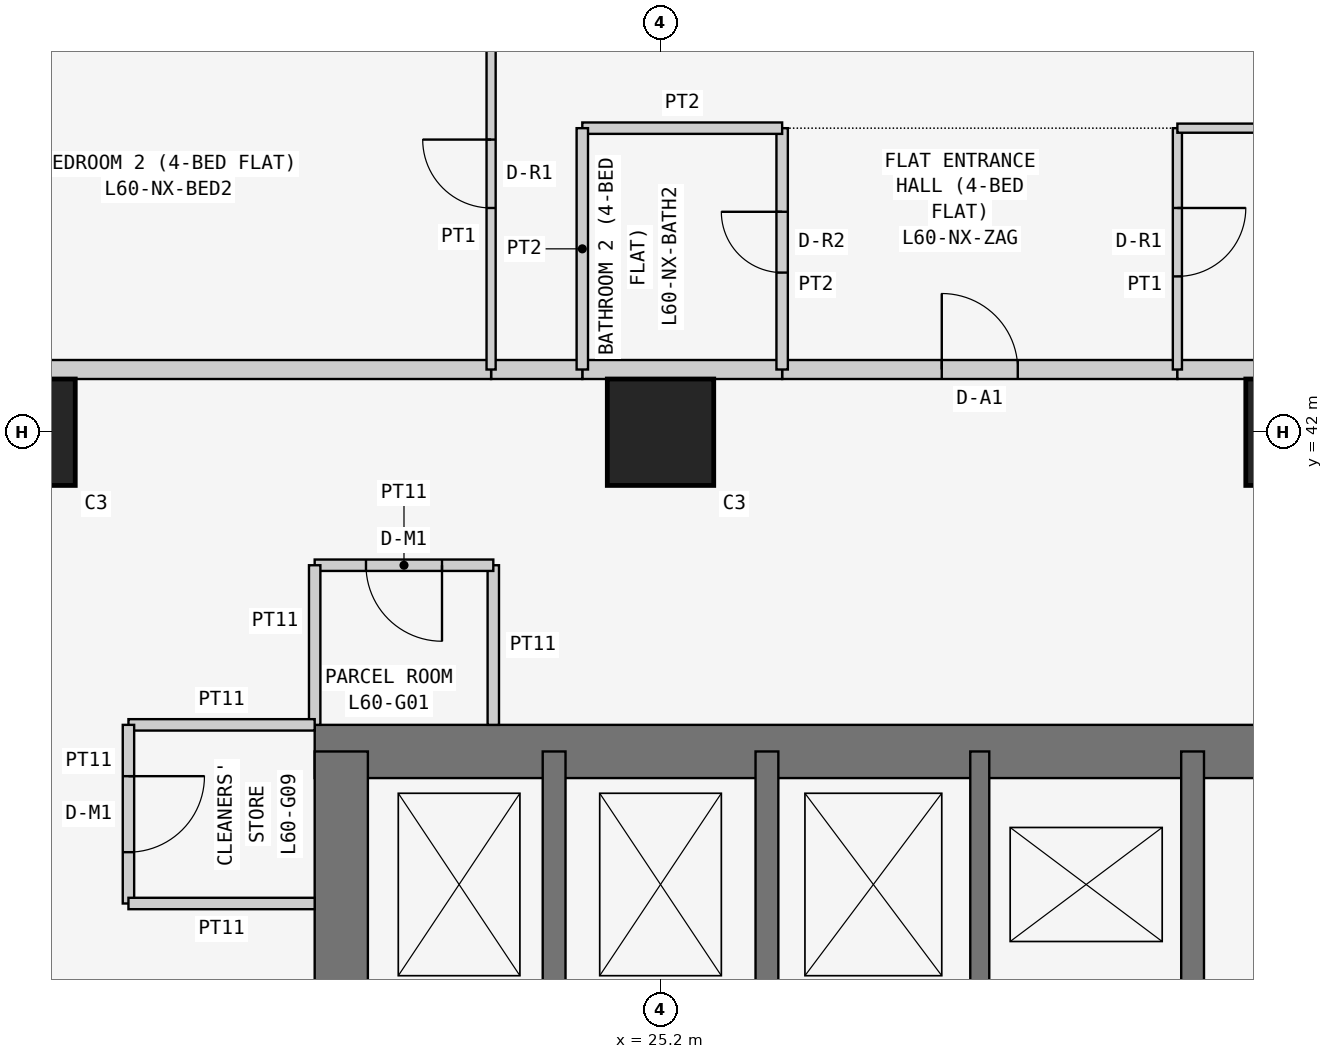
"""IFC4 building model, lengths in metres.
Left out: names, types, materials, properties, quantities, classifications, styles, units other than length and angle.
Written with IfcOpenShell. Run it as: python <this file> out.ifc"""

import sys

from ifc_helpers import new_model, si_unit, direction, frame, frame_2d, origin, origin_2d, place, context, subcontext, project, spatial, rectangle, extrude, element, fill, save


model = new_model("IFC4")
c1 = context("Model", 3, precision=1e-05, world=origin(), true_north=direction((0.0, 1.0)))
c2 = subcontext(c1, "Body", "Model", "MODEL_VIEW")
j1 = project(units=[si_unit("LENGTHUNIT", "METRE"), si_unit("PLANEANGLEUNIT", "RADIAN")], contexts=[c1])
p1 = place(None, origin())
s1 = spatial("IfcSite", under=j1, at=p1, CompositionType="ELEMENT")
p2 = place(p1, origin())
s2 = spatial("IfcBuilding", under=s1, at=p2, CompositionType="ELEMENT")
p3 = place(p2, frame((0.0, 0.0, 230.1)))
s3 = spatial("IfcBuildingStorey", under=s2, at=p3, CompositionType="ELEMENT", Elevation=230.1)
for number, where, z_axis, x_axis in (
    (1, (16.8, 42.0, 0.0), (0.0, 0.0, 1.0), (1.0, 0.0, 0.0)),
    (2, (25.2, 42.0, 0.0), (0.0, 0.0, 1.0), (1.0, 0.0, 0.0)),
    (3, (33.6, 42.0, 0.0), (0.0, 0.0, 1.0), (1.0, 0.0, 0.0)),
):
    element("IfcColumn", number, at=place(p3, frame(where, z_axis=z_axis, x_axis=x_axis)), inside=s3, PredefinedType="COLUMN", context=c2, shape_type="SweptSolid", body=[
        extrude(rectangle(XDim=1.4, YDim=1.4, at=origin_2d()), origin(), (0.0, 0.0, 1.0), 3.6),
    ])
p4 = place(p3, frame((37.8, 37.8, 0.0), z_axis=(0.0, 0.0, 1.0), x_axis=(-1.0, 0.0, 0.0)))
e4 = element("IfcWall", 4, at=p4, inside=s3, PredefinedType="SHEAR", context=c2, shape_type="SweptSolid", body=[
    extrude(rectangle(XDim=17.15, YDim=0.7, at=frame_2d((8.575, 0.0))), origin(), (0.0, 0.0, 1.0), 3.6),
])
p5 = place(p3, frame((21.0, 37.8, 0.0), z_axis=(0.0, 0.0, 1.0), x_axis=(0.0, -1.0, 0.0)))
e5 = element("IfcWall", 5, at=p5, inside=s3, PredefinedType="SHEAR", context=c2, shape_type="SweptSolid", body=[
    extrude(rectangle(XDim=17.15, YDim=0.7, at=frame_2d((8.575, 0.0))), origin(), (0.0, 0.0, 1.0), 3.6),
])
p6 = place(p5, frame((5.4, 0.0, 0.0)))
e6 = element("IfcOpeningElement", 6, at=p6, cuts=e5, PredefinedType="OPENING", context=c2, shape_type="SweptSolid", body=[
    extrude(rectangle(XDim=1.2, YDim=2.1, at=frame_2d((0.6, 1.05))), frame((0.0, 0.36, 0.0), z_axis=(0.0, -1.0, 0.0), x_axis=(1.0, 0.0, 0.0)), (0.0, 0.0, 1.0), 0.72),
])
p7 = place(p3, frame((26.6, 21.0, 0.0), z_axis=(0.0, 0.0, 1.0), x_axis=(0.0, 1.0, 0.0)))
e7 = element("IfcWall", 7, at=p7, inside=s3, PredefinedType="SHEAR", context=c2, shape_type="SweptSolid", body=[
    extrude(rectangle(XDim=16.8, YDim=0.3, at=frame_2d((8.4, 0.0))), origin(), (0.0, 0.0, 1.0), 3.6),
])
p8 = place(p7, frame((10.4, 0.0, 0.0)))
e8 = element("IfcOpeningElement", 8, at=p8, cuts=e7, PredefinedType="OPENING", context=c2, shape_type="SweptSolid", body=[
    extrude(rectangle(XDim=1.2, YDim=2.1, at=frame_2d((0.6, 1.05))), frame((0.0, 0.16, 0.0), z_axis=(0.0, -1.0, 0.0), x_axis=(1.0, 0.0, 0.0)), (0.0, 0.0, 1.0), 0.32),
])
p9 = place(p3, frame((23.8, 34.6, 0.0), z_axis=(0.0, 0.0, 1.0), x_axis=(0.0, 1.0, 0.0)))
e9 = element("IfcWall", 9, at=p9, inside=s3, PredefinedType="SHEAR", context=c2, shape_type="SweptSolid", body=[
    extrude(rectangle(XDim=3.2, YDim=0.3, at=frame_2d((1.6, 0.0))), origin(), (0.0, 0.0, 1.0), 3.6),
])
p10 = place(p3, frame((32.2, 29.25, 0.0), z_axis=(0.0, 0.0, 1.0), x_axis=(0.0, 1.0, 0.0)))
e10 = element("IfcWall", 10, at=p10, inside=s3, PredefinedType="SHEAR", context=c2, shape_type="SweptSolid", body=[
    extrude(rectangle(XDim=8.55, YDim=0.3, at=frame_2d((4.275, 0.0))), origin(), (0.0, 0.0, 1.0), 3.6),
])
p11 = place(p3, frame((29.4, 34.6, 0.0), z_axis=(0.0, 0.0, 1.0), x_axis=(0.0, 1.0, 0.0)))
e11 = element("IfcWall", 11, at=p11, inside=s3, PredefinedType="SHEAR", context=c2, shape_type="SweptSolid", body=[
    extrude(rectangle(XDim=3.2, YDim=0.25, at=frame_2d((1.6, 0.0))), origin(), (0.0, 0.0, 1.0), 3.6),
])
p12 = place(p3, frame((23.0, 38.15, 0.0), z_axis=(0.0, 0.0, 1.0), x_axis=(0.0, 1.0, 0.0)))
e12 = element("IfcWall", 12, at=p12, inside=s3, PredefinedType="PARTITIONING", context=c2, shape_type="SweptSolid", body=[
    extrude(rectangle(XDim=2.1, YDim=0.15, at=frame_2d((1.05, 0.0))), origin(), (0.0, 0.0, 1.0), 3.45),
])
p13 = place(p3, frame((23.0, 40.25, 0.0), z_axis=(0.0, 0.0, 1.0), x_axis=(-1.0, 0.0, 0.0)))
e13 = element("IfcWall", 13, at=p13, inside=s3, PredefinedType="PARTITIONING", context=c2, shape_type="SweptSolid", body=[
    extrude(rectangle(XDim=2.35, YDim=0.15, at=frame_2d((1.175, 0.0))), origin(), (0.0, 0.0, 1.0), 3.45),
])
p14 = place(p13, frame((0.675, 0.0, 0.0)))
e14 = element("IfcOpeningElement", 14, at=p14, cuts=e13, PredefinedType="OPENING", context=c2, shape_type="SweptSolid", body=[
    extrude(rectangle(XDim=1.0, YDim=2.1, at=frame_2d((0.5, 1.05))), frame((0.0, 0.085, 0.0), z_axis=(0.0, -1.0, 0.0), x_axis=(1.0, 0.0, 0.0)), (0.0, 0.0, 1.0), 0.17),
])
p15 = place(p3, frame((20.65, 40.25, 0.0), z_axis=(0.0, 0.0, 1.0), x_axis=(0.0, -1.0, 0.0)))
e15 = element("IfcWall", 15, at=p15, inside=s3, PredefinedType="PARTITIONING", context=c2, shape_type="SweptSolid", body=[
    extrude(rectangle(XDim=2.1, YDim=0.15, at=frame_2d((1.05, 0.0))), origin(), (0.0, 0.0, 1.0), 3.45),
])
p16 = place(p3, frame((20.65, 38.15, 0.0), z_axis=(0.0, 0.0, 1.0), x_axis=(-1.0, 0.0, 0.0)))
e16 = element("IfcWall", 16, at=p16, inside=s3, PredefinedType="PARTITIONING", context=c2, shape_type="SweptSolid", body=[
    extrude(rectangle(XDim=2.45, YDim=0.15, at=frame_2d((1.225, 0.0))), origin(), (0.0, 0.0, 1.0), 3.45),
])
p17 = place(p3, frame((18.2, 38.15, 0.0), z_axis=(0.0, 0.0, 1.0), x_axis=(0.0, -1.0, 0.0)))
e17 = element("IfcWall", 17, at=p17, inside=s3, PredefinedType="PARTITIONING", context=c2, shape_type="SweptSolid", body=[
    extrude(rectangle(XDim=2.35, YDim=0.15, at=frame_2d((1.175, 0.0))), origin(), (0.0, 0.0, 1.0), 3.45),
])
p18 = place(p17, frame((0.675, 0.0, 0.0)))
e18 = element("IfcOpeningElement", 18, at=p18, cuts=e17, PredefinedType="OPENING", context=c2, shape_type="SweptSolid", body=[
    extrude(rectangle(XDim=1.0, YDim=2.1, at=frame_2d((0.5, 1.05))), frame((0.0, 0.085, 0.0), z_axis=(0.0, -1.0, 0.0), x_axis=(1.0, 0.0, 0.0)), (0.0, 0.0, 1.0), 0.17),
])
p19 = place(p3, frame((18.2, 35.8, 0.0), z_axis=(0.0, 0.0, 1.0), x_axis=(1.0, 0.0, 0.0)))
e19 = element("IfcWall", 19, at=p19, inside=s3, PredefinedType="PARTITIONING", context=c2, shape_type="SweptSolid", body=[
    extrude(rectangle(XDim=2.45, YDim=0.15, at=frame_2d((1.225, 0.0))), origin(), (0.0, 0.0, 1.0), 3.45),
])
p20 = place(p3, frame((26.8, 42.825, 0.0), z_axis=(0.0, 0.0, 1.0), x_axis=(1.0, 0.0, 0.0)))
e20 = element("IfcWall", 20, at=p20, inside=s3, PredefinedType="PARTITIONING", context=c2, shape_type="SweptSolid", body=[
    extrude(rectangle(XDim=5.2, YDim=0.25, at=frame_2d((2.6, 0.0))), origin(), (0.0, 0.0, 1.0), 3.45),
])
p21 = place(p20, frame((2.1, 0.0, 0.0)))
e21 = element("IfcOpeningElement", 21, at=p21, cuts=e20, PredefinedType="OPENING", context=c2, shape_type="SweptSolid", body=[
    extrude(rectangle(XDim=1.0, YDim=2.1, at=frame_2d((0.5, 1.05))), frame((0.0, 0.135, 0.0), z_axis=(0.0, -1.0, 0.0), x_axis=(1.0, 0.0, 0.0)), (0.0, 0.0, 1.0), 0.27),
])
p22 = place(p3, frame((24.171, 42.825, 0.0), z_axis=(0.0, 0.0, 1.0), x_axis=(1.0, 0.0, 0.0)))
e22 = element("IfcWall", 22, at=p22, inside=s3, PredefinedType="PARTITIONING", context=c2, shape_type="SweptSolid", body=[
    extrude(rectangle(XDim=2.629, YDim=0.25, at=frame_2d((1.314, 0.0))), origin(), (0.0, 0.0, 1.0), 3.45),
])
p23 = place(p3, frame((32.0, 42.825, 0.0), z_axis=(0.0, 0.0, 1.0), x_axis=(1.0, 0.0, 0.0)))
e23 = element("IfcWall", 23, at=p23, inside=s3, PredefinedType="PARTITIONING", context=c2, shape_type="SweptSolid", body=[
    extrude(rectangle(XDim=2.629, YDim=0.25, at=frame_2d((1.314, 0.0))), origin(), (0.0, 0.0, 1.0), 3.45),
])
p24 = place(p3, frame((22.971, 42.825, 0.0), z_axis=(0.0, 0.0, 1.0), x_axis=(1.0, 0.0, 0.0)))
e24 = element("IfcWall", 24, at=p24, inside=s3, PredefinedType="PARTITIONING", context=c2, shape_type="SweptSolid", body=[
    extrude(rectangle(XDim=1.2, YDim=0.25, at=frame_2d((0.6, 0.0))), origin(), (0.0, 0.0, 1.0), 3.45),
])
p25 = place(p3, frame((16.1, 42.825, 0.0), z_axis=(0.0, 0.0, 1.0), x_axis=(1.0, 0.0, 0.0)))
e25 = element("IfcWall", 25, at=p25, inside=s3, PredefinedType="PARTITIONING", context=c2, shape_type="SweptSolid", body=[
    extrude(rectangle(XDim=6.871, YDim=0.25, at=frame_2d((3.436, 0.0))), origin(), (0.0, 0.0, 1.0), 3.45),
])
p26 = place(p3, frame((26.8, 46.0, 0.0), z_axis=(0.0, 0.0, 1.0), x_axis=(0.0, -1.0, 0.0)))
e26 = element("IfcWall", 26, at=p26, inside=s3, PredefinedType="PARTITIONING", context=c2, shape_type="SweptSolid", body=[
    extrude(rectangle(XDim=3.175, YDim=0.15, at=frame_2d((1.587, 0.0))), origin(), (0.0, 0.0, 1.0), 3.45),
])
p27 = place(p26, frame((1.1, 0.0, 0.0)))
e27 = element("IfcOpeningElement", 27, at=p27, cuts=e26, PredefinedType="OPENING", context=c2, shape_type="SweptSolid", body=[
    extrude(rectangle(XDim=0.8, YDim=2.1, at=frame_2d((0.4, 1.05))), frame((0.0, 0.085, 0.0), z_axis=(0.0, -1.0, 0.0), x_axis=(1.0, 0.0, 0.0)), (0.0, 0.0, 1.0), 0.17),
])
p28 = place(p3, frame((32.0, 42.825, 0.0), z_axis=(0.0, 0.0, 1.0), x_axis=(0.0, 1.0, 0.0)))
e28 = element("IfcWall", 28, at=p28, inside=s3, PredefinedType="PARTITIONING", context=c2, shape_type="SweptSolid", body=[
    extrude(rectangle(XDim=3.175, YDim=0.12, at=frame_2d((1.587, 0.0))), origin(), (0.0, 0.0, 1.0), 3.45),
])
p29 = place(p28, frame((1.225, 0.0, 0.0)))
e29 = element("IfcOpeningElement", 29, at=p29, cuts=e28, PredefinedType="OPENING", context=c2, shape_type="SweptSolid", body=[
    extrude(rectangle(XDim=0.9, YDim=2.1, at=frame_2d((0.45, 1.05))), frame((0.0, 0.07, 0.0), z_axis=(0.0, -1.0, 0.0), x_axis=(1.0, 0.0, 0.0)), (0.0, 0.0, 1.0), 0.14),
])
p30 = place(p3, frame((26.8, 46.0, 0.0), z_axis=(0.0, 0.0, 1.0), x_axis=(-1.0, 0.0, 0.0)))
e30 = element("IfcWall", 30, at=p30, inside=s3, PredefinedType="PARTITIONING", context=c2, shape_type="SweptSolid", body=[
    extrude(rectangle(XDim=2.629, YDim=0.15, at=frame_2d((1.314, 0.0))), origin(), (0.0, 0.0, 1.0), 3.45),
])
p31 = place(p3, frame((24.171, 46.0, 0.0), z_axis=(0.0, 0.0, 1.0), x_axis=(0.0, -1.0, 0.0)))
e31 = element("IfcWall", 31, at=p31, inside=s3, PredefinedType="PARTITIONING", context=c2, shape_type="SweptSolid", body=[
    extrude(rectangle(XDim=3.175, YDim=0.15, at=frame_2d((1.587, 0.0))), origin(), (0.0, 0.0, 1.0), 3.45),
])
p32 = place(p3, frame((34.629, 46.0, 0.0), z_axis=(0.0, 0.0, 1.0), x_axis=(-1.0, 0.0, 0.0)))
e32 = element("IfcWall", 32, at=p32, inside=s3, PredefinedType="PARTITIONING", context=c2, shape_type="SweptSolid", body=[
    extrude(rectangle(XDim=2.629, YDim=0.12, at=frame_2d((1.314, 0.0))), origin(), (0.0, 0.0, 1.0), 3.45),
])
p33 = place(p3, frame((22.971, 42.825, 0.0), z_axis=(0.0, 0.0, 1.0), x_axis=(0.0, 1.0, 0.0)))
e33 = element("IfcWall", 33, at=p33, inside=s3, PredefinedType="PARTITIONING", context=c2, shape_type="SweptSolid", body=[
    extrude(rectangle(XDim=4.975, YDim=0.12, at=frame_2d((2.488, 0.0))), origin(), (0.0, 0.0, 1.0), 3.45),
])
p34 = place(p33, frame((2.125, 0.0, 0.0)))
e34 = element("IfcOpeningElement", 34, at=p34, cuts=e33, PredefinedType="OPENING", context=c2, shape_type="SweptSolid", body=[
    extrude(rectangle(XDim=0.9, YDim=2.1, at=frame_2d((0.45, 1.05))), frame((0.0, 0.07, 0.0), z_axis=(0.0, -1.0, 0.0), x_axis=(1.0, 0.0, 0.0)), (0.0, 0.0, 1.0), 0.14),
])
p35 = place(p14, origin())
e35 = element("IfcDoor", 35, at=p35, inside=s3, OperationType="SINGLE_SWING_LEFT", PredefinedType="DOOR", context=c2, shape_type="SweptSolid", body=[
    extrude(rectangle(XDim=1.0, YDim=2.1, at=frame_2d((0.5, 1.05))), frame((0.0, 0.025, 0.0), z_axis=(0.0, -1.0, 0.0), x_axis=(1.0, 0.0, 0.0)), (0.0, 0.0, 1.0), 0.05),
])
fill(e14, e35)
p36 = place(p18, origin())
e36 = element("IfcDoor", 36, at=p36, inside=s3, OperationType="SINGLE_SWING_LEFT", PredefinedType="DOOR", context=c2, shape_type="SweptSolid", body=[
    extrude(rectangle(XDim=1.0, YDim=2.1, at=frame_2d((0.5, 1.05))), frame((0.0, 0.025, 0.0), z_axis=(0.0, -1.0, 0.0), x_axis=(1.0, 0.0, 0.0)), (0.0, 0.0, 1.0), 0.05),
])
fill(e18, e36)
p37 = place(p21, origin())
e37 = element("IfcDoor", 37, at=p37, inside=s3, OperationType="SINGLE_SWING_LEFT", PredefinedType="DOOR", context=c2, shape_type="SweptSolid", body=[
    extrude(rectangle(XDim=1.0, YDim=2.1, at=frame_2d((0.5, 1.05))), frame((0.0, 0.025, 0.0), z_axis=(0.0, -1.0, 0.0), x_axis=(1.0, 0.0, 0.0)), (0.0, 0.0, 1.0), 0.05),
])
fill(e21, e37)
p38 = place(p27, frame((0.8, 0.0, 0.0), z_axis=(0.0, 0.0, 1.0), x_axis=(-1.0, 0.0, 0.0)))
e38 = element("IfcDoor", 38, at=p38, inside=s3, OperationType="SINGLE_SWING_RIGHT", PredefinedType="DOOR", context=c2, shape_type="SweptSolid", body=[
    extrude(rectangle(XDim=0.8, YDim=2.1, at=frame_2d((0.4, 1.05))), frame((0.0, 0.025, 0.0), z_axis=(0.0, -1.0, 0.0), x_axis=(1.0, 0.0, 0.0)), (0.0, 0.0, 1.0), 0.05),
])
fill(e27, e38)
p39 = place(p29, frame((0.9, 0.0, 0.0), z_axis=(0.0, 0.0, 1.0), x_axis=(-1.0, 0.0, 0.0)))
e39 = element("IfcDoor", 39, at=p39, inside=s3, OperationType="SINGLE_SWING_LEFT", PredefinedType="DOOR", context=c2, shape_type="SweptSolid", body=[
    extrude(rectangle(XDim=0.9, YDim=2.1, at=frame_2d((0.45, 1.05))), frame((0.0, 0.025, 0.0), z_axis=(0.0, -1.0, 0.0), x_axis=(1.0, 0.0, 0.0)), (0.0, 0.0, 1.0), 0.05),
])
fill(e29, e39)
p40 = place(p34, origin())
e40 = element("IfcDoor", 40, at=p40, inside=s3, OperationType="SINGLE_SWING_RIGHT", PredefinedType="DOOR", context=c2, shape_type="SweptSolid", body=[
    extrude(rectangle(XDim=0.9, YDim=2.1, at=frame_2d((0.45, 1.05))), frame((0.0, 0.025, 0.0), z_axis=(0.0, -1.0, 0.0), x_axis=(1.0, 0.0, 0.0)), (0.0, 0.0, 1.0), 0.05),
])
fill(e34, e40)
save(model, sys.argv[1])
